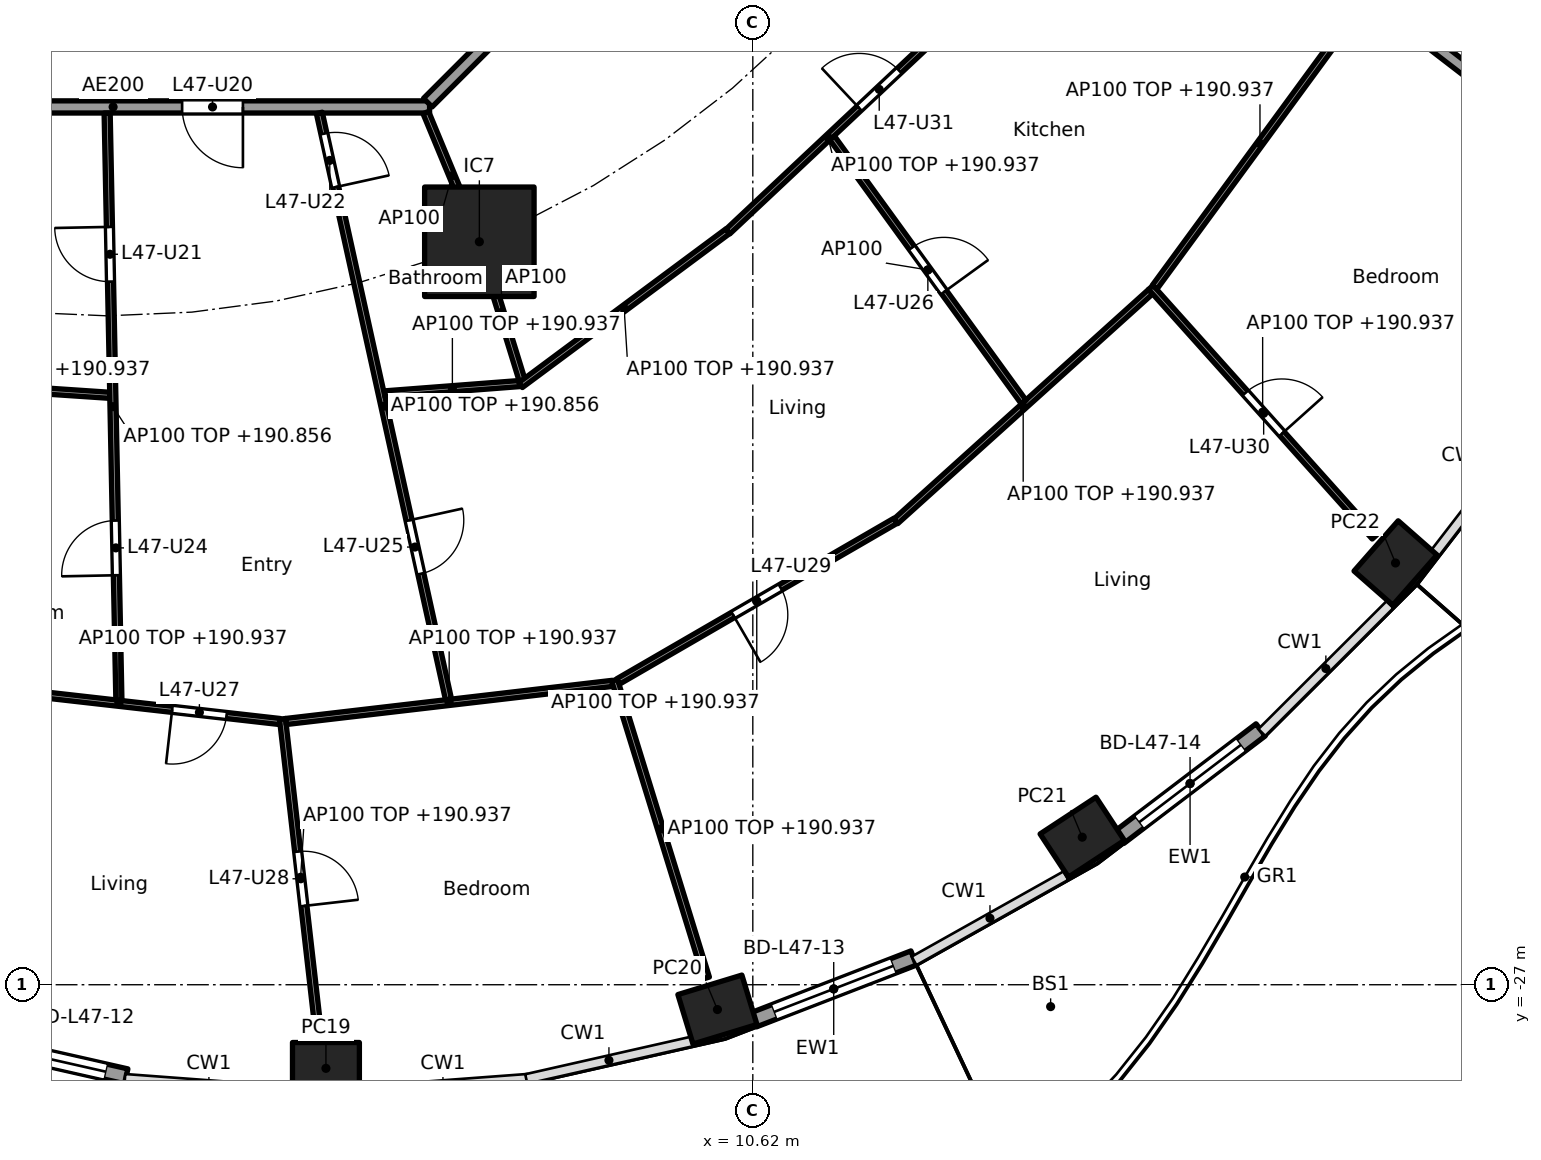
"""IFC4 building model, lengths in metres.
Left out: names, types, materials, properties, quantities, classifications, styles, units other than length and angle.
Written with IfcOpenShell. Run it as: python <this file> out.ifc"""

import sys

from ifc_helpers import new_model, si_unit, direction, frame, frame_2d, origin, origin_2d, place, context, subcontext, project, spatial, rectangle, hollow_rectangle, extrude, element, fill, save


model = new_model("IFC4")
c1 = context("Model", 3, precision=1e-05, world=origin(), true_north=direction((0.0, 1.0)))
c2 = subcontext(c1, "Body", "Model", "MODEL_VIEW")
j1 = project(units=[si_unit("LENGTHUNIT", "METRE"), si_unit("PLANEANGLEUNIT", "RADIAN")], contexts=[c1])
p1 = place(None, origin())
s1 = spatial("IfcSite", under=j1, at=p1, CompositionType="ELEMENT")
p2 = place(p1, origin())
s2 = spatial("IfcBuilding", under=s1, at=p2, CompositionType="ELEMENT")
p3 = place(p2, frame((0.0, 0.0, 188.1)))
s3 = spatial("IfcBuildingStorey", under=s2, at=p3, CompositionType="ELEMENT", Elevation=188.1)
for number, where, z_axis, x_axis in (
    (1, (3.6, -28.375, 0.0), (0.0, 0.0, 1.0), (1.0, 0.0, 0.0)),
    (2, (10.038, -27.408, 0.0), (0.0, 0.0, 1.0), (0.957, 0.292, 0.0)),
    (3, (16.038, -24.573, 0.0), (0.0, 0.0, 1.0), (0.836, 0.549, 0.0)),
    (4, (21.189, -20.064, 0.0), (0.0, 0.0, 1.0), (0.66, 0.751, 0.0)),
):
    element("IfcColumn", number, at=place(p3, frame(where, z_axis=z_axis, x_axis=x_axis)), inside=s3, PredefinedType="COLUMN", context=c2, shape_type="SweptSolid", body=[
        extrude(hollow_rectangle(XDim=1.1, YDim=0.85, WallThickness=0.036, at=origin_2d()), origin(), (0.0, 0.0, 1.0), 3.7),
    ])
p4 = place(p3, frame((6.123, -14.782, 0.0), z_axis=(0.0, 0.0, 1.0), x_axis=(1.0, 0.0, 0.0)))
e5 = element("IfcColumn", 5, at=p4, inside=s3, PredefinedType="COLUMN", context=c2, shape_type="SweptSolid", body=[
    extrude(rectangle(XDim=1.8, YDim=1.8, at=origin_2d()), origin(), (0.0, 0.0, 1.0), 3.7),
])
p5 = place(p3, frame((0.315, -28.506, 0.0), z_axis=(0.0, 0.0, 1.0), x_axis=(-0.975324329911, 0.220776926974, 0.0)))
e6 = element("IfcWall", 6, at=p5, inside=s3, PredefinedType="SOLIDWALL", context=c2, shape_type="SweptSolid", body=[
    extrude(rectangle(XDim=2.788, YDim=0.25, at=frame_2d((1.394, 0.0))), origin(), (0.0, 0.0, 1.0), 3.44),
])
p6 = place(p5, frame((0.344, 0.0, 0.0)))
e7 = element("IfcOpeningElement", 7, at=p6, cuts=e6, PredefinedType="OPENING", context=c2, shape_type="SweptSolid", body=[
    extrude(rectangle(XDim=2.1, YDim=2.4, at=frame_2d((1.05, 1.2))), frame((0.0, 0.135, 0.0), z_axis=(0.0, -1.0, 0.0), x_axis=(1.0, 0.0, 0.0)), (0.0, 0.0, 1.0), 0.27),
])
p7 = place(p3, frame((13.266, -26.56, 0.0), z_axis=(0.0, 0.0, 1.0), x_axis=(-0.932806734513, -0.360377019311, 0.0)))
e8 = element("IfcWall", 8, at=p7, inside=s3, PredefinedType="SOLIDWALL", context=c2, shape_type="SweptSolid", body=[
    extrude(rectangle(XDim=2.82, YDim=0.25, at=frame_2d((1.41, 0.0))), origin(), (0.0, 0.0, 1.0), 3.44),
])
p8 = place(p7, frame((0.36, 0.0, 0.0)))
e9 = element("IfcOpeningElement", 9, at=p8, cuts=e8, PredefinedType="OPENING", context=c2, shape_type="SweptSolid", body=[
    extrude(rectangle(XDim=2.1, YDim=2.4, at=frame_2d((1.05, 1.2))), frame((0.0, 0.135, 0.0), z_axis=(0.0, -1.0, 0.0), x_axis=(1.0, 0.0, 0.0)), (0.0, 0.0, 1.0), 0.27),
])
p9 = place(p3, frame((18.972, -22.809, 0.0), z_axis=(0.0, 0.0, 1.0), x_axis=(-0.796055733703, -0.60522332146, 0.0)))
e10 = element("IfcWall", 10, at=p9, inside=s3, PredefinedType="SOLIDWALL", context=c2, shape_type="SweptSolid", body=[
    extrude(rectangle(XDim=2.917, YDim=0.25, at=frame_2d((1.458, 0.0))), origin(), (0.0, 0.0, 1.0), 3.44),
])
p10 = place(p9, frame((0.408, 0.0, 0.0)))
e11 = element("IfcOpeningElement", 11, at=p10, cuts=e10, PredefinedType="OPENING", context=c2, shape_type="SweptSolid", body=[
    extrude(rectangle(XDim=2.1, YDim=2.4, at=frame_2d((1.05, 1.2))), frame((0.0, 0.135, 0.0), z_axis=(0.0, -1.0, 0.0), x_axis=(1.0, 0.0, 0.0)), (0.0, 0.0, 1.0), 0.27),
])
p11 = place(p3, frame((14.822, -6.154, 0.0), z_axis=(0.0, 0.0, 1.0), x_axis=(0.792203056092, -0.610257583254, 0.0)))
e12 = element("IfcWall", 12, at=p11, inside=s3, PredefinedType="PARTITIONING", context=c2, shape_type="SweptSolid", body=[
    extrude(rectangle(XDim=12.533, YDim=0.2, at=frame_2d((6.266, 0.0))), origin(), (0.0, 0.0, 1.0), 2.837),
])
p12 = place(p3, frame((-5.104, -12.565, 0.0), z_axis=(0.0, 0.0, 1.0), x_axis=(1.0, 0.0, 0.0)))
e13 = element("IfcWall", 13, at=p12, inside=s3, PredefinedType="PARTITIONING", context=c2, shape_type="SweptSolid", body=[
    extrude(rectangle(XDim=10.409, YDim=0.2, at=frame_2d((5.205, 0.0))), origin(), (0.0, 0.0, 1.0), 3.44),
])
p13 = place(p12, frame((6.339, 0.0, 0.0)))
e14 = element("IfcOpeningElement", 14, at=p13, cuts=e13, PredefinedType="OPENING", context=c2, shape_type="SweptSolid", body=[
    extrude(rectangle(XDim=1.0, YDim=2.1, at=frame_2d((0.5, 1.05))), frame((0.0, 0.11, 0.0), z_axis=(0.0, -1.0, 0.0), x_axis=(1.0, 0.0, 0.0)), (0.0, 0.0, 1.0), 0.22),
])
p14 = place(p3, frame((5.275, -12.494, 0.0), z_axis=(0.0, 0.0, 1.0), x_axis=(0.707106781187, 0.707106781187, 0.0)))
e15 = element("IfcWall", 15, at=p14, inside=s3, PredefinedType="PARTITIONING", context=c2, shape_type="SweptSolid", body=[
    extrude(rectangle(XDim=10.409, YDim=0.2, at=frame_2d((5.205, 0.0))), origin(), (0.0, 0.0, 1.0), 3.44),
])
p15 = place(p3, frame((-2.055, -17.166, 0.0), z_axis=(0.0, 0.0, 1.0), x_axis=(0.997756833447, -0.06694252243, 0.0)))
e16 = element("IfcWall", 16, at=p15, inside=s3, PredefinedType="PARTITIONING", context=c2, shape_type="SweptSolid", body=[
    extrude(rectangle(XDim=2.104, YDim=0.1, at=frame_2d((1.052, 0.0))), origin(), (0.0, 0.0, 1.0), 2.837),
])
p16 = place(p3, frame((-2.449, -22.073, 0.0), z_axis=(0.0, 0.0, 1.0), x_axis=(0.993660315081, -0.112424099879, 0.0)))
e17 = element("IfcWall", 17, at=p16, inside=s3, PredefinedType="PARTITIONING", context=c2, shape_type="SweptSolid", body=[
    extrude(rectangle(XDim=5.325, YDim=0.1, at=frame_2d((2.662, 0.0))), origin(), (0.0, 0.0, 1.0), 2.837),
])
p17 = place(p16, frame((3.544, 0.0, 0.0)))
e18 = element("IfcOpeningElement", 18, at=p17, cuts=e17, PredefinedType="OPENING", context=c2, shape_type="SweptSolid", body=[
    extrude(rectangle(XDim=0.9, YDim=2.1, at=frame_2d((0.45, 1.05))), frame((0.0, 0.06, 0.0), z_axis=(0.0, -1.0, 0.0), x_axis=(1.0, 0.0, 0.0)), (0.0, 0.0, 1.0), 0.12),
])
p18 = place(p3, frame((0.002, -12.665, 0.0), z_axis=(0.0, 0.0, 1.0), x_axis=(0.019992969345, -0.999800120613, 0.0)))
e19 = element("IfcWall", 19, at=p18, inside=s3, PredefinedType="PARTITIONING", context=c2, shape_type="SweptSolid", body=[
    extrude(rectangle(XDim=9.659, YDim=0.1, at=frame_2d((4.83, 0.0))), origin(), (0.0, 0.0, 1.0), 2.756),
])
p19 = place(p18, frame((1.873, 0.0, 0.0)))
e20 = element("IfcOpeningElement", 20, at=p19, cuts=e19, PredefinedType="OPENING", context=c2, shape_type="SweptSolid", body=[
    extrude(rectangle(XDim=0.9, YDim=2.1, at=frame_2d((0.45, 1.05))), frame((0.0, 0.06, 0.0), z_axis=(0.0, -1.0, 0.0), x_axis=(1.0, 0.0, 0.0)), (0.0, 0.0, 1.0), 0.12),
])
p20 = place(p18, frame((6.703, 0.0, 0.0)))
e21 = element("IfcOpeningElement", 21, at=p20, cuts=e19, PredefinedType="OPENING", context=c2, shape_type="SweptSolid", body=[
    extrude(rectangle(XDim=0.9, YDim=2.1, at=frame_2d((0.45, 1.05))), frame((0.0, 0.06, 0.0), z_axis=(0.0, -1.0, 0.0), x_axis=(1.0, 0.0, 0.0)), (0.0, 0.0, 1.0), 0.12),
])
p21 = place(p3, frame((2.885, -22.627, 0.0), z_axis=(0.0, 0.0, 1.0), x_axis=(0.113634556485, -0.993522615531, 0.0)))
e22 = element("IfcWall", 22, at=p21, inside=s3, PredefinedType="PARTITIONING", context=c2, shape_type="SweptSolid", body=[
    extrude(rectangle(XDim=5.244, YDim=0.1, at=frame_2d((2.622, 0.0))), origin(), (0.0, 0.0, 1.0), 2.837),
])
p22 = place(p21, frame((2.197, 0.0, 0.0)))
e23 = element("IfcOpeningElement", 23, at=p22, cuts=e22, PredefinedType="OPENING", context=c2, shape_type="SweptSolid", body=[
    extrude(rectangle(XDim=0.9, YDim=2.1, at=frame_2d((0.45, 1.05))), frame((0.0, 0.06, 0.0), z_axis=(0.0, -1.0, 0.0), x_axis=(1.0, 0.0, 0.0)), (0.0, 0.0, 1.0), 0.12),
])
p23 = place(p3, frame((2.941, -22.671, 0.0), z_axis=(0.0, 0.0, 1.0), x_axis=(0.993245806382, 0.1160291692, 0.0)))
e24 = element("IfcWall", 24, at=p23, inside=s3, PredefinedType="PARTITIONING", context=c2, shape_type="SweptSolid", body=[
    extrude(rectangle(XDim=5.408, YDim=0.1, at=frame_2d((2.704, 0.0))), origin(), (0.0, 0.0, 1.0), 2.837),
])
p24 = place(p3, frame((3.491, -12.662, 0.0), z_axis=(0.0, 0.0, 1.0), x_axis=(0.215082442833, -0.976595895335, 0.0)))
e25 = element("IfcWall", 25, at=p24, inside=s3, PredefinedType="PARTITIONING", context=c2, shape_type="SweptSolid", body=[
    extrude(rectangle(XDim=9.878, YDim=0.1, at=frame_2d((4.939, 0.0))), origin(), (0.0, 0.0, 1.0), 2.756),
])
p25 = place(p24, frame((0.35, 0.0, 0.0)))
e26 = element("IfcOpeningElement", 26, at=p25, cuts=e25, PredefinedType="OPENING", context=c2, shape_type="SweptSolid", body=[
    extrude(rectangle(XDim=0.9, YDim=2.1, at=frame_2d((0.45, 1.05))), frame((0.0, 0.06, 0.0), z_axis=(0.0, -1.0, 0.0), x_axis=(1.0, 0.0, 0.0)), (0.0, 0.0, 1.0), 0.12),
])
p26 = place(p24, frame((6.861, 0.0, 0.0)))
e27 = element("IfcOpeningElement", 27, at=p26, cuts=e25, PredefinedType="OPENING", context=c2, shape_type="SweptSolid", body=[
    extrude(rectangle(XDim=0.9, YDim=2.1, at=frame_2d((0.45, 1.05))), frame((0.0, 0.06, 0.0), z_axis=(0.0, -1.0, 0.0), x_axis=(1.0, 0.0, 0.0)), (0.0, 0.0, 1.0), 0.12),
])
p27 = place(p3, frame((4.568, -17.284, 0.0), z_axis=(0.0, 0.0, 1.0), x_axis=(0.997076339393, 0.076411867029, 0.0)))
e28 = element("IfcWall", 28, at=p27, inside=s3, PredefinedType="PARTITIONING", context=c2, shape_type="SweptSolid", body=[
    extrude(rectangle(XDim=2.23, YDim=0.1, at=frame_2d((1.115, 0.0))), origin(), (0.0, 0.0, 1.0), 2.837),
])
p28 = place(p3, frame((5.243, -12.657, 0.0), z_axis=(0.0, 0.0, 1.0), x_axis=(0.382719158442, -0.923864733477, 0.0)))
e29 = element("IfcWall", 29, at=p28, inside=s3, PredefinedType="PARTITIONING", context=c2, shape_type="SweptSolid", body=[
    extrude(rectangle(XDim=2.25, YDim=0.1, at=frame_2d((1.125, 0.0))), origin(), (0.0, 0.0, 1.0), 3.44),
])
p29 = place(p3, frame((6.138, -14.83, 0.0), z_axis=(0.0, 0.0, 1.0), x_axis=(0.29476151767, -0.955570849127, 0.0)))
e30 = element("IfcWall", 30, at=p29, inside=s3, PredefinedType="PARTITIONING", context=c2, shape_type="SweptSolid", body=[
    extrude(rectangle(XDim=2.336, YDim=0.1, at=frame_2d((1.168, 0.0))), origin(), (0.0, 0.0, 1.0), 3.44),
])
p30 = place(p3, frame((6.801, -17.139, 0.0), z_axis=(0.0, 0.0, 1.0), x_axis=(0.802795005531, 0.596255129198, 0.0)))
e31 = element("IfcWall", 31, at=p30, inside=s3, PredefinedType="PARTITIONING", context=c2, shape_type="SweptSolid", body=[
    extrude(rectangle(XDim=4.242, YDim=0.1, at=frame_2d((2.121, 0.0))), origin(), (0.0, 0.0, 1.0), 2.837),
])
p31 = place(p3, frame((8.347, -21.99, 0.0), z_axis=(0.0, 0.0, 1.0), x_axis=(0.294828785667, -0.955550096616, 0.0)))
e32 = element("IfcWall", 32, at=p31, inside=s3, PredefinedType="PARTITIONING", context=c2, shape_type="SweptSolid", body=[
    extrude(rectangle(XDim=5.126, YDim=0.1, at=frame_2d((2.563, 0.0))), origin(), (0.0, 0.0, 1.0), 2.837),
])
p32 = place(p3, frame((8.405, -22.013, 0.0), z_axis=(0.0, 0.0, 1.0), x_axis=(0.865277177388, 0.501293732547, 0.0)))
e33 = element("IfcWall", 33, at=p32, inside=s3, PredefinedType="PARTITIONING", context=c2, shape_type="SweptSolid", body=[
    extrude(rectangle(XDim=5.27, YDim=0.1, at=frame_2d((2.635, 0.0))), origin(), (0.0, 0.0, 1.0), 2.837),
])
p33 = place(p32, frame((2.185, 0.0, 0.0)))
e34 = element("IfcOpeningElement", 34, at=p33, cuts=e33, PredefinedType="OPENING", context=c2, shape_type="SweptSolid", body=[
    extrude(rectangle(XDim=0.9, YDim=2.1, at=frame_2d((0.45, 1.05))), frame((0.0, 0.06, 0.0), z_axis=(0.0, -1.0, 0.0), x_axis=(1.0, 0.0, 0.0)), (0.0, 0.0, 1.0), 0.12),
])
p34 = place(p3, frame((10.21, -14.614, 0.0), z_axis=(0.0, 0.0, 1.0), x_axis=(0.728883199496, 0.684638066055, 0.0)))
e35 = element("IfcWall", 35, at=p34, inside=s3, PredefinedType="PARTITIONING", context=c2, shape_type="SweptSolid", body=[
    extrude(rectangle(XDim=4.519, YDim=0.1, at=frame_2d((2.26, 0.0))), origin(), (0.0, 0.0, 1.0), 2.837),
])
p35 = place(p34, frame((2.964, 0.0, 0.0)))
e36 = element("IfcOpeningElement", 36, at=p35, cuts=e35, PredefinedType="OPENING", context=c2, shape_type="SweptSolid", body=[
    extrude(rectangle(XDim=0.9, YDim=2.1, at=frame_2d((0.45, 1.05))), frame((0.0, 0.06, 0.0), z_axis=(0.0, -1.0, 0.0), x_axis=(1.0, 0.0, 0.0)), (0.0, 0.0, 1.0), 0.12),
])
p36 = place(p3, frame((12.971, -19.38, 0.0), z_axis=(0.0, 0.0, 1.0), x_axis=(0.742768881471, 0.669547898748, 0.0)))
e37 = element("IfcWall", 37, at=p36, inside=s3, PredefinedType="PARTITIONING", context=c2, shape_type="SweptSolid", body=[
    extrude(rectangle(XDim=5.642, YDim=0.1, at=frame_2d((2.821, 0.0))), origin(), (0.0, 0.0, 1.0), 2.837),
])
p37 = place(p3, frame((11.923, -13.073, 0.0), z_axis=(0.0, 0.0, 1.0), x_axis=(0.587178522891, -0.809457461672, 0.0)))
e38 = element("IfcWall", 38, at=p37, inside=s3, PredefinedType="PARTITIONING", context=c2, shape_type="SweptSolid", body=[
    extrude(rectangle(XDim=5.366, YDim=0.1, at=frame_2d((2.683, 0.0))), origin(), (0.0, 0.0, 1.0), 3.44),
])
p38 = place(p37, frame((2.233, 0.0, 0.0)))
e39 = element("IfcOpeningElement", 39, at=p38, cuts=e38, PredefinedType="OPENING", context=c2, shape_type="SweptSolid", body=[
    extrude(rectangle(XDim=0.9, YDim=2.1, at=frame_2d((0.45, 1.05))), frame((0.0, 0.06, 0.0), z_axis=(0.0, -1.0, 0.0), x_axis=(1.0, 0.0, 0.0)), (0.0, 0.0, 1.0), 0.12),
])
p39 = place(p3, frame((17.166, -15.532, 0.0), z_axis=(0.0, 0.0, 1.0), x_axis=(0.66728415915, -0.744803229684, 0.0)))
e40 = element("IfcWall", 40, at=p39, inside=s3, PredefinedType="PARTITIONING", context=c2, shape_type="SweptSolid", body=[
    extrude(rectangle(XDim=5.511, YDim=0.1, at=frame_2d((2.756, 0.0))), origin(), (0.0, 0.0, 1.0), 2.837),
])
p40 = place(p39, frame((2.331, 0.0, 0.0)))
e41 = element("IfcOpeningElement", 41, at=p40, cuts=e40, PredefinedType="OPENING", context=c2, shape_type="SweptSolid", body=[
    extrude(rectangle(XDim=0.9, YDim=2.1, at=frame_2d((0.45, 1.05))), frame((0.0, 0.06, 0.0), z_axis=(0.0, -1.0, 0.0), x_axis=(1.0, 0.0, 0.0)), (0.0, 0.0, 1.0), 0.12),
])
p41 = place(p3, frame((17.229, -15.529, 0.0), z_axis=(0.0, 0.0, 1.0), x_axis=(0.591110768293, 0.806590391468, 0.0)))
e42 = element("IfcWall", 42, at=p41, inside=s3, PredefinedType="PARTITIONING", context=c2, shape_type="SweptSolid", body=[
    extrude(rectangle(XDim=5.86, YDim=0.1, at=frame_2d((2.93, 0.0))), origin(), (0.0, 0.0, 1.0), 2.837),
])
p42 = place(p6, origin())
e43 = element("IfcDoor", 43, at=p42, inside=s3, OperationType="SLIDING_TO_LEFT", PredefinedType="DOOR", context=c2, shape_type="SweptSolid", body=[
    extrude(rectangle(XDim=2.1, YDim=2.4, at=frame_2d((1.05, 1.2))), frame((0.0, 0.025, 0.0), z_axis=(0.0, -1.0, 0.0), x_axis=(1.0, 0.0, 0.0)), (0.0, 0.0, 1.0), 0.05),
])
fill(e7, e43)
p43 = place(p8, origin())
e44 = element("IfcDoor", 44, at=p43, inside=s3, OperationType="SLIDING_TO_LEFT", PredefinedType="DOOR", context=c2, shape_type="SweptSolid", body=[
    extrude(rectangle(XDim=2.1, YDim=2.4, at=frame_2d((1.05, 1.2))), frame((0.0, 0.025, 0.0), z_axis=(0.0, -1.0, 0.0), x_axis=(1.0, 0.0, 0.0)), (0.0, 0.0, 1.0), 0.05),
])
fill(e9, e44)
p44 = place(p10, origin())
e45 = element("IfcDoor", 45, at=p44, inside=s3, OperationType="SLIDING_TO_LEFT", PredefinedType="DOOR", context=c2, shape_type="SweptSolid", body=[
    extrude(rectangle(XDim=2.1, YDim=2.4, at=frame_2d((1.05, 1.2))), frame((0.0, 0.025, 0.0), z_axis=(0.0, -1.0, 0.0), x_axis=(1.0, 0.0, 0.0)), (0.0, 0.0, 1.0), 0.05),
])
fill(e11, e45)
p45 = place(p13, frame((1.0, 0.0, 0.0), x_axis=(-1.0, 0.0, 0.0)))
e46 = element("IfcDoor", 46, at=p45, inside=s3, OperationType="SINGLE_SWING_LEFT", PredefinedType="DOOR", context=c2, shape_type="SweptSolid", body=[
    extrude(rectangle(XDim=1.0, YDim=2.1, at=frame_2d((0.5, 1.05))), frame((0.0, 0.025, 0.0), z_axis=(0.0, -1.0, 0.0), x_axis=(1.0, 0.0, 0.0)), (0.0, 0.0, 1.0), 0.05),
])
fill(e14, e46)
p46 = place(p19, frame((0.9, 0.0, 0.0), x_axis=(-1.0, 0.0, 0.0)))
e47 = element("IfcDoor", 47, at=p46, inside=s3, OperationType="SINGLE_SWING_RIGHT", PredefinedType="DOOR", context=c2, shape_type="SweptSolid", body=[
    extrude(rectangle(XDim=0.9, YDim=2.1, at=frame_2d((0.45, 1.05))), frame((0.0, 0.025, 0.0), z_axis=(0.0, -1.0, 0.0), x_axis=(1.0, 0.0, 0.0)), (0.0, 0.0, 1.0), 0.05),
])
fill(e20, e47)
p47 = place(p25, origin())
e48 = element("IfcDoor", 48, at=p47, inside=s3, OperationType="SINGLE_SWING_RIGHT", PredefinedType="DOOR", context=c2, shape_type="SweptSolid", body=[
    extrude(rectangle(XDim=0.9, YDim=2.1, at=frame_2d((0.45, 1.05))), frame((0.0, 0.025, 0.0), z_axis=(0.0, -1.0, 0.0), x_axis=(1.0, 0.0, 0.0)), (0.0, 0.0, 1.0), 0.05),
])
fill(e26, e48)
p48 = place(p20, frame((0.9, 0.0, 0.0), x_axis=(-1.0, 0.0, 0.0)))
e49 = element("IfcDoor", 49, at=p48, inside=s3, OperationType="SINGLE_SWING_LEFT", PredefinedType="DOOR", context=c2, shape_type="SweptSolid", body=[
    extrude(rectangle(XDim=0.9, YDim=2.1, at=frame_2d((0.45, 1.05))), frame((0.0, 0.025, 0.0), z_axis=(0.0, -1.0, 0.0), x_axis=(1.0, 0.0, 0.0)), (0.0, 0.0, 1.0), 0.05),
])
fill(e21, e49)
p49 = place(p26, origin())
e50 = element("IfcDoor", 50, at=p49, inside=s3, OperationType="SINGLE_SWING_LEFT", PredefinedType="DOOR", context=c2, shape_type="SweptSolid", body=[
    extrude(rectangle(XDim=0.9, YDim=2.1, at=frame_2d((0.45, 1.05))), frame((0.0, 0.025, 0.0), z_axis=(0.0, -1.0, 0.0), x_axis=(1.0, 0.0, 0.0)), (0.0, 0.0, 1.0), 0.05),
])
fill(e27, e50)
p50 = place(p38, origin())
e51 = element("IfcDoor", 51, at=p50, inside=s3, OperationType="SINGLE_SWING_RIGHT", PredefinedType="DOOR", context=c2, shape_type="SweptSolid", body=[
    extrude(rectangle(XDim=0.9, YDim=2.1, at=frame_2d((0.45, 1.05))), frame((0.0, 0.025, 0.0), z_axis=(0.0, -1.0, 0.0), x_axis=(1.0, 0.0, 0.0)), (0.0, 0.0, 1.0), 0.05),
])
fill(e39, e51)
p51 = place(p17, frame((0.9, 0.0, 0.0), x_axis=(-1.0, 0.0, 0.0)))
e52 = element("IfcDoor", 52, at=p51, inside=s3, OperationType="SINGLE_SWING_RIGHT", PredefinedType="DOOR", context=c2, shape_type="SweptSolid", body=[
    extrude(rectangle(XDim=0.9, YDim=2.1, at=frame_2d((0.45, 1.05))), frame((0.0, 0.025, 0.0), z_axis=(0.0, -1.0, 0.0), x_axis=(1.0, 0.0, 0.0)), (0.0, 0.0, 1.0), 0.05),
])
fill(e18, e52)
p52 = place(p22, origin())
e53 = element("IfcDoor", 53, at=p52, inside=s3, OperationType="SINGLE_SWING_RIGHT", PredefinedType="DOOR", context=c2, shape_type="SweptSolid", body=[
    extrude(rectangle(XDim=0.9, YDim=2.1, at=frame_2d((0.45, 1.05))), frame((0.0, 0.025, 0.0), z_axis=(0.0, -1.0, 0.0), x_axis=(1.0, 0.0, 0.0)), (0.0, 0.0, 1.0), 0.05),
])
fill(e23, e53)
p53 = place(p33, frame((0.9, 0.0, 0.0), x_axis=(-1.0, 0.0, 0.0)))
e54 = element("IfcDoor", 54, at=p53, inside=s3, OperationType="SINGLE_SWING_RIGHT", PredefinedType="DOOR", context=c2, shape_type="SweptSolid", body=[
    extrude(rectangle(XDim=0.9, YDim=2.1, at=frame_2d((0.45, 1.05))), frame((0.0, 0.025, 0.0), z_axis=(0.0, -1.0, 0.0), x_axis=(1.0, 0.0, 0.0)), (0.0, 0.0, 1.0), 0.05),
])
fill(e34, e54)
p54 = place(p40, origin())
e55 = element("IfcDoor", 55, at=p54, inside=s3, OperationType="SINGLE_SWING_RIGHT", PredefinedType="DOOR", context=c2, shape_type="SweptSolid", body=[
    extrude(rectangle(XDim=0.9, YDim=2.1, at=frame_2d((0.45, 1.05))), frame((0.0, 0.025, 0.0), z_axis=(0.0, -1.0, 0.0), x_axis=(1.0, 0.0, 0.0)), (0.0, 0.0, 1.0), 0.05),
])
fill(e41, e55)
p55 = place(p35, origin())
e56 = element("IfcDoor", 56, at=p55, inside=s3, OperationType="SINGLE_SWING_LEFT", PredefinedType="DOOR", context=c2, shape_type="SweptSolid", body=[
    extrude(rectangle(XDim=0.9, YDim=2.1, at=frame_2d((0.45, 1.05))), frame((0.0, 0.025, 0.0), z_axis=(0.0, -1.0, 0.0), x_axis=(1.0, 0.0, 0.0)), (0.0, 0.0, 1.0), 0.05),
])
fill(e36, e56)
save(model, sys.argv[1])
